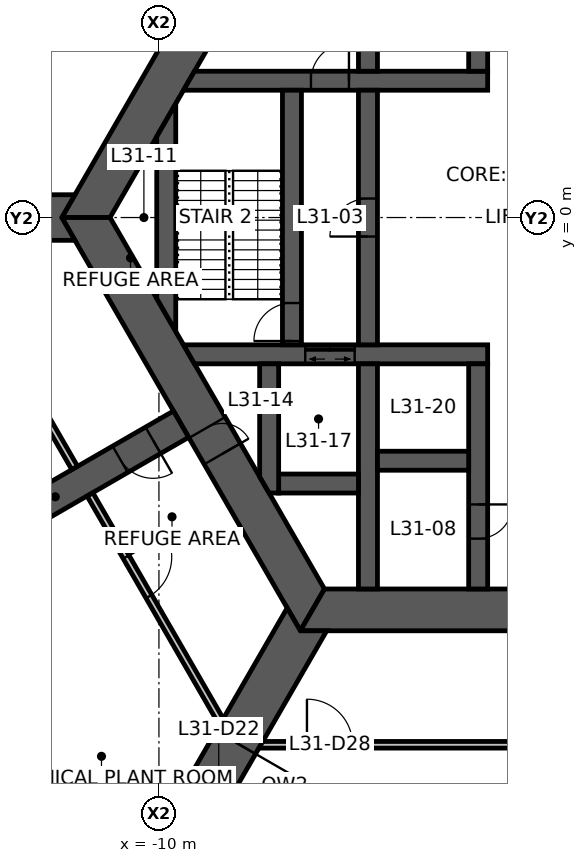
"""IFC4 building model, lengths in metres.
Left out: names, types, materials, properties, quantities, classifications, styles, units other than length and angle.
Written with IfcOpenShell. Run it as: python <this file> out.ifc"""

import sys

from ifc_helpers import new_model, si_unit, direction, frame, frame_2d, origin, place, context, subcontext, project, spatial, polyline, rectangle, outline, extrude, element, fill, save


model = new_model("IFC4")
c1 = context("Model", 3, precision=1e-05, world=origin(), true_north=direction((0.0, 1.0)))
c2 = subcontext(c1, "Body", "Model", "MODEL_VIEW")
j1 = project(units=[si_unit("LENGTHUNIT", "METRE"), si_unit("PLANEANGLEUNIT", "RADIAN")], contexts=[c1])
p1 = place(None, origin())
s1 = spatial("IfcSite", under=j1, at=p1, CompositionType="ELEMENT")
p2 = place(p1, origin())
s2 = spatial("IfcBuilding", under=s1, at=p2, CompositionType="ELEMENT")
p3 = place(p2, frame((0.0, 0.0, 123.6)))
s3 = spatial("IfcBuildingStorey", under=s2, at=p3, CompositionType="ELEMENT", Elevation=123.6)
p4 = place(p3, frame((-5.961, 10.325, 0.0), z_axis=(0.0, 0.0, 1.0), x_axis=(-0.500004296715, -0.866022923061, 0.0)))
e1 = element("IfcWall", 1, at=p4, inside=s3, PredefinedType="SHEAR", context=c2, shape_type="SweptSolid", body=[
    extrude(outline(polyline([(-0.318, -0.55), (4.494, -0.55), (5.494, -0.55), (12.24, -0.55), (11.605, 0.55), (5.494, 0.55), (4.494, 0.55), (0.318, 0.55), (-0.318, -0.55)])), origin(), (0.0, 0.0, 1.0), 5.0),
])
p5 = place(p4, frame((4.494, 0.0, 0.0)))
e2 = element("IfcOpeningElement", 2, at=p5, cuts=e1, PredefinedType="OPENING", context=c2, shape_type="SweptSolid", body=[
    extrude(rectangle(XDim=1.0, YDim=2.1, at=frame_2d((0.5, 1.05))), frame((0.0, 0.56, 0.0), z_axis=(0.0, -1.0, 0.0), x_axis=(1.0, 0.0, 0.0)), (0.0, 0.0, 1.0), 1.12),
])
p6 = place(p3, frame((-11.922, 0.0, 0.0), z_axis=(0.0, 0.0, 1.0), x_axis=(0.500004296715, -0.866022923061, 0.0)))
e3 = element("IfcWall", 3, at=p6, inside=s3, PredefinedType="SHEAR", context=c2, shape_type="SweptSolid", body=[
    extrude(outline(polyline([(-0.318, -0.55), (6.381, -0.55), (7.181, -0.55), (12.24, -0.55), (11.605, 0.55), (7.181, 0.55), (6.381, 0.55), (0.318, 0.55), (-0.318, -0.55)])), origin(), (0.0, 0.0, 1.0), 5.0),
])
p7 = place(p6, frame((6.381, 0.0, 0.0)))
e4 = element("IfcOpeningElement", 4, at=p7, cuts=e3, PredefinedType="OPENING", context=c2, shape_type="SweptSolid", body=[
    extrude(rectangle(XDim=0.8, YDim=2.1, at=frame_2d((0.4, 1.05))), frame((0.0, 0.56, 0.0), z_axis=(0.0, -1.0, 0.0), x_axis=(1.0, 0.0, 0.0)), (0.0, 0.0, 1.0), 1.12),
])
p8 = place(p3, frame((-5.961, -10.325, 0.0), z_axis=(0.0, 0.0, 1.0), x_axis=(1.0, 0.0, 0.0)))
e5 = element("IfcWall", 5, at=p8, inside=s3, PredefinedType="SHEAR", context=c2, shape_type="SweptSolid", body=[
    extrude(outline(polyline([(-0.318, -0.55), (5.461, -0.55), (6.461, -0.55), (12.24, -0.55), (11.605, 0.55), (6.461, 0.55), (5.461, 0.55), (0.318, 0.55), (-0.318, -0.55)])), origin(), (0.0, 0.0, 1.0), 5.0),
])
p9 = place(p8, frame((5.461, 0.0, 0.0)))
e6 = element("IfcOpeningElement", 6, at=p9, cuts=e5, PredefinedType="OPENING", context=c2, shape_type="SweptSolid", body=[
    extrude(rectangle(XDim=1.0, YDim=2.1, at=frame_2d((0.5, 1.05))), frame((0.0, 0.56, 0.0), z_axis=(0.0, -1.0, 0.0), x_axis=(1.0, 0.0, 0.0)), (0.0, 0.0, 1.0), 1.12),
])
p10 = place(p3, frame((-9.418, -5.438, 0.0), z_axis=(0.0, 0.0, 1.0), x_axis=(-0.866029782078, -0.499992416496, 0.0)))
e7 = element("IfcWall", 7, at=p10, inside=s3, PredefinedType="SHEAR", context=c2, shape_type="SweptSolid", body=[
    extrude(rectangle(XDim=7.646, YDim=0.8, at=frame_2d((3.823, 0.0))), origin(), (0.0, 0.0, 1.0), 5.0),
])
p11 = place(p10, frame((0.85, 0.0, 0.0)))
e8 = element("IfcOpeningElement", 8, at=p11, cuts=e7, PredefinedType="OPENING", context=c2, shape_type="SweptSolid", body=[
    extrude(rectangle(XDim=1.0, YDim=2.1, at=frame_2d((0.5, 1.05))), frame((0.0, 0.41, 0.0), z_axis=(0.0, -1.0, 0.0), x_axis=(1.0, 0.0, 0.0)), (0.0, 0.0, 1.0), 0.82),
])
p12 = place(p3, frame((-12.557, 0.0, -1.15), z_axis=(0.0, 0.0, 1.0), x_axis=(-1.0, 0.0, 0.0)))
e9 = element("IfcWall", 9, at=p12, inside=s3, PredefinedType="SHEAR", context=c2, shape_type="SweptSolid", body=[
    extrude(outline(polyline([(-0.346, -0.6), (7.443, -0.6), (7.443, 0.6), (-0.346, 0.6), (0.0, 0.0), (-0.346, -0.6)])), origin(), (0.0, 0.0, 1.0), 6.15),
])
p13 = place(p3, frame((-6.279, -10.875, -1.15), z_axis=(0.0, 0.0, 1.0), x_axis=(-0.50000923905, -0.866020069551, 0.0)))
e10 = element("IfcWall", 10, at=p13, inside=s3, PredefinedType="SHEAR", context=c2, shape_type="SweptSolid", body=[
    extrude(outline(polyline([(-0.346, -0.6), (3.395, -0.6), (5.195, -0.6), (7.443, -0.6), (7.443, 0.6), (5.195, 0.6), (3.395, 0.6), (-0.346, 0.6), (0.0, 0.0), (-0.346, -0.6)])), origin(), (0.0, 0.0, 1.0), 6.15),
])
p14 = place(p13, frame((3.395, 0.0, 1.15)))
e11 = element("IfcOpeningElement", 11, at=p14, cuts=e10, PredefinedType="OPENING", context=c2, shape_type="SweptSolid", body=[
    extrude(rectangle(XDim=1.8, YDim=2.4, at=frame_2d((0.9, 1.2))), frame((0.0, 0.61, 0.0), z_axis=(0.0, -1.0, 0.0), x_axis=(1.0, 0.0, 0.0)), (0.0, 0.0, 1.0), 1.22),
])
p15 = place(p3, frame((-10.65, 17.395, 0.0), z_axis=(0.0, 0.0, 1.0), x_axis=(-0.499999841607, -0.866025495233, 0.0)))
e12 = element("IfcWall", 12, at=p15, inside=s3, PredefinedType="ELEMENTEDWALL", context=c2, shape_type="SweptSolid", body=[
    extrude(rectangle(XDim=19.479, YDim=0.2, at=frame_2d((9.739, 0.0))), origin(), (0.0, 0.0, 1.0), 5.0),
])
p16 = place(p3, frame((-9.209, 3.6, 0.0), z_axis=(0.0, 0.0, 1.0), x_axis=(1.0, 0.0, 0.0)))
e13 = element("IfcWall", 13, at=p16, inside=s3, PredefinedType="SHEAR", context=c2, shape_type="SweptSolid", body=[
    extrude(outline(polyline([(-0.144, -0.25), (3.209, -0.25), (4.209, -0.25), (7.859, -0.25), (7.859, 0.25), (4.209, 0.25), (3.209, 0.25), (0.144, 0.25), (-0.144, -0.25)])), origin(), (0.0, 0.0, 1.0), 5.0),
])
p17 = place(p16, frame((3.209, 0.0, 0.0)))
e14 = element("IfcOpeningElement", 14, at=p17, cuts=e13, PredefinedType="OPENING", context=c2, shape_type="SweptSolid", body=[
    extrude(rectangle(XDim=1.0, YDim=2.1, at=frame_2d((0.5, 1.05))), frame((0.0, 0.26, 0.0), z_axis=(0.0, -1.0, 0.0), x_axis=(1.0, 0.0, 0.0)), (0.0, 0.0, 1.0), 0.52),
])
p18 = place(p3, frame((-9.209, -3.6, 0.0), z_axis=(0.0, 0.0, 1.0), x_axis=(1.0, 0.0, 0.0)))
e15 = element("IfcWall", 15, at=p18, inside=s3, PredefinedType="SHEAR", context=c2, shape_type="SweptSolid", body=[
    extrude(outline(polyline([(0.144, -0.25), (3.059, -0.25), (4.359, -0.25), (7.859, -0.25), (7.859, 0.25), (4.359, 0.25), (3.059, 0.25), (-0.144, 0.25), (0.144, -0.25)])), origin(), (0.0, 0.0, 1.0), 5.0),
])
p19 = place(p18, frame((3.059, 0.0, 0.0)))
e16 = element("IfcOpeningElement", 16, at=p19, cuts=e15, PredefinedType="OPENING", context=c2, shape_type="SweptSolid", body=[
    extrude(rectangle(XDim=1.3, YDim=2.1, at=frame_2d((0.65, 1.05))), frame((0.0, 0.26, 0.0), z_axis=(0.0, -1.0, 0.0), x_axis=(1.0, 0.0, 0.0)), (0.0, 0.0, 1.0), 0.52),
])
p20 = place(p3, frame((-1.6, 3.85, 0.0), z_axis=(0.0, 0.0, 1.0), x_axis=(0.0, 1.0, 0.0)))
e17 = element("IfcWall", 17, at=p20, inside=s3, PredefinedType="SHEAR", context=c2, shape_type="SweptSolid", body=[
    extrude(rectangle(XDim=5.925, YDim=0.5, at=frame_2d((2.962, 0.0))), origin(), (0.0, 0.0, 1.0), 5.0),
])
p21 = place(p20, frame((3.7, 0.0, 0.0)))
e18 = element("IfcOpeningElement", 18, at=p21, cuts=e17, PredefinedType="OPENING", context=c2, shape_type="SweptSolid", body=[
    extrude(rectangle(XDim=0.9, YDim=2.1, at=frame_2d((0.45, 1.05))), frame((0.0, 0.26, 0.0), z_axis=(0.0, -1.0, 0.0), x_axis=(1.0, 0.0, 0.0)), (0.0, 0.0, 1.0), 0.52),
])
p22 = place(p3, frame((-1.6, -3.85, 0.0), z_axis=(0.0, 0.0, 1.0), x_axis=(0.0, -1.0, 0.0)))
e19 = element("IfcWall", 19, at=p22, inside=s3, PredefinedType="SHEAR", context=c2, shape_type="SweptSolid", body=[
    extrude(rectangle(XDim=5.925, YDim=0.5, at=frame_2d((2.962, 0.0))), origin(), (0.0, 0.0, 1.0), 5.0),
])
p23 = place(p22, frame((3.7, 0.0, 0.0)))
e20 = element("IfcOpeningElement", 20, at=p23, cuts=e19, PredefinedType="OPENING", context=c2, shape_type="SweptSolid", body=[
    extrude(rectangle(XDim=0.9, YDim=2.1, at=frame_2d((0.45, 1.05))), frame((0.0, 0.26, 0.0), z_axis=(0.0, -1.0, 0.0), x_axis=(1.0, 0.0, 0.0)), (0.0, 0.0, 1.0), 0.52),
])
p24 = place(p3, frame((-4.5, -3.35, 0.0), z_axis=(0.0, 0.0, 1.0), x_axis=(0.0, 1.0, 0.0)))
e21 = element("IfcWall", 21, at=p24, inside=s3, PredefinedType="SHEAR", context=c2, shape_type="SweptSolid", body=[
    extrude(rectangle(XDim=6.7, YDim=0.5, at=frame_2d((3.35, 0.0))), origin(), (0.0, 0.0, 1.0), 5.0),
])
p25 = place(p24, frame((2.85, 0.0, 0.0)))
e22 = element("IfcOpeningElement", 22, at=p25, cuts=e21, PredefinedType="OPENING", context=c2, shape_type="SweptSolid", body=[
    extrude(rectangle(XDim=1.0, YDim=2.1, at=frame_2d((0.5, 1.05))), frame((0.0, 0.26, 0.0), z_axis=(0.0, -1.0, 0.0), x_axis=(1.0, 0.0, 0.0)), (0.0, 0.0, 1.0), 0.52),
])
p26 = place(p3, frame((-6.5, -3.35, 0.0), z_axis=(0.0, 0.0, 1.0), x_axis=(0.0, 1.0, 0.0)))
e23 = element("IfcWall", 23, at=p26, inside=s3, PredefinedType="SHEAR", context=c2, shape_type="SweptSolid", body=[
    extrude(rectangle(XDim=6.7, YDim=0.5, at=frame_2d((3.35, 0.0))), origin(), (0.0, 0.0, 1.0), 5.0),
])
p27 = place(p26, frame((0.1, 0.0, 0.0)))
e24 = element("IfcOpeningElement", 24, at=p27, cuts=e23, PredefinedType="OPENING", context=c2, shape_type="SweptSolid", body=[
    extrude(rectangle(XDim=1.0, YDim=2.1, at=frame_2d((0.5, 1.05))), frame((0.0, 0.26, 0.0), z_axis=(0.0, -1.0, 0.0), x_axis=(1.0, 0.0, 0.0)), (0.0, 0.0, 1.0), 0.52),
])
for number, where, z_axis, x_axis in (
    (25, (-4.5, 3.85, 0.0), (0.0, 0.0, 1.0), (0.0, 1.0, 0.0)),
    (26, (-4.5, -3.85, 0.0), (0.0, 0.0, 1.0), (0.0, -1.0, 0.0)),
):
    element("IfcWall", number, at=place(p3, frame(where, z_axis=z_axis, x_axis=x_axis)), inside=s3, PredefinedType="SHEAR", context=c2, shape_type="SweptSolid", body=[
        extrude(rectangle(XDim=5.925, YDim=0.5, at=frame_2d((2.962, 0.0))), origin(), (0.0, 0.0, 1.0), 5.0),
    ])
p28 = place(p3, frame((-4.25, -6.4, 0.0), z_axis=(0.0, 0.0, 1.0), x_axis=(1.0, 0.0, 0.0)))
e27 = element("IfcWall", 27, at=p28, inside=s3, PredefinedType="SHEAR", context=c2, shape_type="SweptSolid", body=[
    extrude(rectangle(XDim=2.4, YDim=0.5, at=frame_2d((1.2, 0.0))), origin(), (0.0, 0.0, 1.0), 5.0),
])
p29 = place(p3, frame((-6.85, -7.0, 0.0), z_axis=(0.0, 0.0, 1.0), x_axis=(1.0, 0.0, 0.0)))
e28 = element("IfcWall", 28, at=p29, inside=s3, PredefinedType="SHEAR", context=c2, shape_type="SweptSolid", body=[
    extrude(rectangle(XDim=2.1, YDim=0.5, at=frame_2d((1.05, 0.0))), origin(), (0.0, 0.0, 1.0), 5.0),
])
p30 = place(p3, frame((-7.1, -3.85, 0.0), z_axis=(0.0, 0.0, 1.0), x_axis=(0.0, -1.0, 0.0)))
e29 = element("IfcWall", 29, at=p30, inside=s3, PredefinedType="SHEAR", context=c2, shape_type="SweptSolid", body=[
    extrude(outline(polyline([(0.0, -0.25), (2.969, -0.25), (3.4, 0.0), (3.4, 0.25), (0.0, 0.25), (0.0, -0.25)])), origin(), (0.0, 0.0, 1.0), 5.0),
])
p31 = place(p3, frame((-9.808, -2.562, 0.0), z_axis=(0.0, 0.0, 1.0), x_axis=(0.0, 1.0, 0.0)))
e30 = element("IfcWall", 30, at=p31, inside=s3, PredefinedType="SHEAR", context=c2, shape_type="SweptSolid", body=[
    extrude(outline(polyline([(-0.433, -0.25), (5.558, -0.25), (4.691, 0.25), (0.433, 0.25), (-0.433, -0.25)])), origin(), (0.0, 0.0, 1.0), 5.0),
])
p32 = place(p3, frame((-8.357, 13.275, 0.0), z_axis=(0.0, 0.0, 1.0), x_axis=(-0.500003545903, -0.866023356546, 0.0)))
e31 = element("IfcWall", 31, at=p32, inside=s3, PredefinedType="PARTITIONING", context=c2, shape_type="SweptSolid", body=[
    extrude(outline(polyline([(-0.051, -0.087), (1.213, -0.087), (2.413, -0.087), (14.686, -0.087), (14.585, 0.087), (2.413, 0.087), (1.213, 0.087), (0.051, 0.087), (-0.051, -0.087)])), origin(), (0.0, 0.0, 1.0), 4.8),
])
p33 = place(p32, frame((1.213, 0.0, 0.0)))
e32 = element("IfcOpeningElement", 32, at=p33, cuts=e31, PredefinedType="OPENING", context=c2, shape_type="SweptSolid", body=[
    extrude(rectangle(XDim=1.2, YDim=2.1, at=frame_2d((0.6, 1.05))), frame((0.0, 0.098, 0.0), z_axis=(0.0, -1.0, 0.0), x_axis=(1.0, 0.0, 0.0)), (0.0, 0.0, 1.0), 0.195),
])
p34 = place(p3, frame((-15.675, -0.6, 0.0), z_axis=(0.0, 0.0, 1.0), x_axis=(0.500005739714, -0.866022089933, 0.0)))
e33 = element("IfcWall", 33, at=p34, inside=s3, PredefinedType="PARTITIONING", context=c2, shape_type="SweptSolid", body=[
    extrude(outline(polyline([(-0.051, -0.087), (6.913, -0.087), (6.913, 0.087), (0.051, 0.087), (-0.051, -0.087)])), origin(), (0.0, 0.0, 1.0), 4.8),
])
p35 = place(p3, frame((-11.814, -7.288, 0.0), z_axis=(0.0, 0.0, 1.0), x_axis=(0.500005739714, -0.866022089933, 0.0)))
e34 = element("IfcWall", 34, at=p35, inside=s3, PredefinedType="PARTITIONING", context=c2, shape_type="SweptSolid", body=[
    extrude(outline(polyline([(0.0, -0.087), (1.9, -0.087), (3.1, -0.087), (6.964, -0.087), (6.863, 0.087), (3.1, 0.087), (1.9, 0.087), (0.0, 0.087), (0.0, -0.087)])), origin(), (0.0, 0.0, 1.0), 4.8),
])
p36 = place(p35, frame((1.9, 0.0, 0.0)))
e35 = element("IfcOpeningElement", 35, at=p36, cuts=e34, PredefinedType="OPENING", context=c2, shape_type="SweptSolid", body=[
    extrude(rectangle(XDim=1.2, YDim=2.1, at=frame_2d((0.6, 1.05))), frame((0.0, 0.098, 0.0), z_axis=(0.0, -1.0, 0.0), x_axis=(1.0, 0.0, 0.0)), (0.0, 0.0, 1.0), 0.195),
])
p37 = place(p3, frame((-7.318, -13.875, 0.0), z_axis=(0.0, 0.0, 1.0), x_axis=(1.0, 0.0, 0.0)))
e36 = element("IfcWall", 36, at=p37, inside=s3, PredefinedType="PARTITIONING", context=c2, shape_type="SweptSolid", body=[
    extrude(outline(polyline([(-0.051, -0.087), (1.213, -0.087), (2.413, -0.087), (14.686, -0.087), (14.585, 0.087), (2.413, 0.087), (1.213, 0.087), (0.051, 0.087), (-0.051, -0.087)])), origin(), (0.0, 0.0, 1.0), 4.8),
])
p38 = place(p37, frame((1.213, 0.0, 0.0)))
e37 = element("IfcOpeningElement", 37, at=p38, cuts=e36, PredefinedType="OPENING", context=c2, shape_type="SweptSolid", body=[
    extrude(rectangle(XDim=1.2, YDim=2.1, at=frame_2d((0.6, 1.05))), frame((0.0, 0.098, 0.0), z_axis=(0.0, -1.0, 0.0), x_axis=(1.0, 0.0, 0.0)), (0.0, 0.0, 1.0), 0.195),
])
p39 = place(p7, origin())
e38 = element("IfcDoor", 38, at=p39, inside=s3, OperationType="SINGLE_SWING_RIGHT", PredefinedType="DOOR", context=c2, shape_type="SweptSolid", body=[
    extrude(rectangle(XDim=0.8, YDim=2.1, at=frame_2d((0.4, 1.05))), frame((0.0, 0.025, 0.0), z_axis=(0.0, -1.0, 0.0), x_axis=(1.0, 0.0, 0.0)), (0.0, 0.0, 1.0), 0.05),
])
fill(e4, e38)
p40 = place(p25, origin())
e39 = element("IfcDoor", 39, at=p40, inside=s3, OperationType="SINGLE_SWING_LEFT", PredefinedType="DOOR", context=c2, shape_type="SweptSolid", body=[
    extrude(rectangle(XDim=1.0, YDim=2.1, at=frame_2d((0.5, 1.05))), frame((0.0, 0.025, 0.0), z_axis=(0.0, -1.0, 0.0), x_axis=(1.0, 0.0, 0.0)), (0.0, 0.0, 1.0), 0.05),
])
fill(e22, e39)
p41 = place(p27, origin())
e40 = element("IfcDoor", 40, at=p41, inside=s3, OperationType="SINGLE_SWING_LEFT", PredefinedType="DOOR", context=c2, shape_type="SweptSolid", body=[
    extrude(rectangle(XDim=1.0, YDim=2.1, at=frame_2d((0.5, 1.05))), frame((0.0, 0.025, 0.0), z_axis=(0.0, -1.0, 0.0), x_axis=(1.0, 0.0, 0.0)), (0.0, 0.0, 1.0), 0.05),
])
fill(e24, e40)
p42 = place(p17, origin())
e41 = element("IfcDoor", 41, at=p42, inside=s3, OperationType="SINGLE_SWING_RIGHT", PredefinedType="DOOR", context=c2, shape_type="SweptSolid", body=[
    extrude(rectangle(XDim=1.0, YDim=2.1, at=frame_2d((0.5, 1.05))), frame((0.0, 0.025, 0.0), z_axis=(0.0, -1.0, 0.0), x_axis=(1.0, 0.0, 0.0)), (0.0, 0.0, 1.0), 0.05),
])
fill(e14, e41)
p43 = place(p23, origin())
e42 = element("IfcDoor", 42, at=p43, inside=s3, OperationType="SINGLE_SWING_LEFT", PredefinedType="DOOR", context=c2, shape_type="SweptSolid", body=[
    extrude(rectangle(XDim=0.9, YDim=2.1, at=frame_2d((0.45, 1.05))), frame((0.0, 0.025, 0.0), z_axis=(0.0, -1.0, 0.0), x_axis=(1.0, 0.0, 0.0)), (0.0, 0.0, 1.0), 0.05),
])
fill(e20, e42)
p44 = place(p11, origin())
e43 = element("IfcDoor", 43, at=p44, inside=s3, OperationType="SINGLE_SWING_LEFT", PredefinedType="DOOR", context=c2, shape_type="SweptSolid", body=[
    extrude(rectangle(XDim=1.0, YDim=2.1, at=frame_2d((0.5, 1.05))), frame((0.0, 0.025, 0.0), z_axis=(0.0, -1.0, 0.0), x_axis=(1.0, 0.0, 0.0)), (0.0, 0.0, 1.0), 0.05),
])
fill(e8, e43)
p45 = place(p14, origin())
e44 = element("IfcDoor", 44, at=p45, inside=s3, OperationType="DOUBLE_DOOR_SINGLE_SWING", PredefinedType="DOOR", context=c2, shape_type="SweptSolid", body=[
    extrude(rectangle(XDim=1.8, YDim=2.4, at=frame_2d((0.9, 1.2))), frame((0.0, 0.025, 0.0), z_axis=(0.0, -1.0, 0.0), x_axis=(1.0, 0.0, 0.0)), (0.0, 0.0, 1.0), 0.05),
])
fill(e11, e44)
p46 = place(p36, origin())
e45 = element("IfcDoor", 45, at=p46, inside=s3, OperationType="DOUBLE_DOOR_SINGLE_SWING", PredefinedType="DOOR", context=c2, shape_type="SweptSolid", body=[
    extrude(rectangle(XDim=1.2, YDim=2.1, at=frame_2d((0.6, 1.05))), frame((0.0, 0.025, 0.0), z_axis=(0.0, -1.0, 0.0), x_axis=(1.0, 0.0, 0.0)), (0.0, 0.0, 1.0), 0.05),
])
fill(e35, e45)
p47 = place(p38, origin())
e46 = element("IfcDoor", 46, at=p47, inside=s3, OperationType="DOUBLE_DOOR_SINGLE_SWING", PredefinedType="DOOR", context=c2, shape_type="SweptSolid", body=[
    extrude(rectangle(XDim=1.2, YDim=2.1, at=frame_2d((0.6, 1.05))), frame((0.0, 0.025, 0.0), z_axis=(0.0, -1.0, 0.0), x_axis=(1.0, 0.0, 0.0)), (0.0, 0.0, 1.0), 0.05),
])
fill(e37, e46)
p48 = place(p19, origin())
e47 = element("IfcDoor", 47, at=p48, inside=s3, OperationType="DOUBLE_DOOR_SLIDING", PredefinedType="DOOR", context=c2, shape_type="SweptSolid", body=[
    extrude(rectangle(XDim=1.3, YDim=2.1, at=frame_2d((0.65, 1.05))), frame((0.0, 0.025, 0.0), z_axis=(0.0, -1.0, 0.0), x_axis=(1.0, 0.0, 0.0)), (0.0, 0.0, 1.0), 0.05),
])
fill(e16, e47)
save(model, sys.argv[1])
